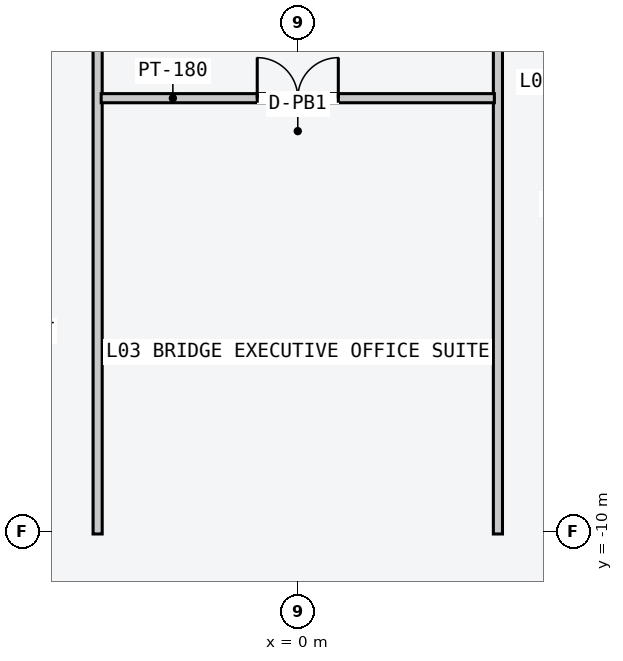
"""IFC4 building model, lengths in metres.
Left out: names, types, materials, properties, quantities, classifications, styles, units other than length and angle.
Written with IfcOpenShell. Run it as: python <this file> out.ifc"""

import sys

from ifc_helpers import new_model, si_unit, direction, frame, frame_2d, origin, place, context, subcontext, project, spatial, rectangle, extrude, element, fill, save


model = new_model("IFC4")
c1 = context("Model", 3, precision=1e-05, world=origin(), true_north=direction((0.0, 1.0)))
c2 = subcontext(c1, "Body", "Model", "MODEL_VIEW")
j1 = project(units=[si_unit("LENGTHUNIT", "METRE"), si_unit("PLANEANGLEUNIT", "RADIAN")], contexts=[c1])
p1 = place(None, origin())
s1 = spatial("IfcSite", under=j1, at=p1, CompositionType="ELEMENT")
p2 = place(p1, origin())
s2 = spatial("IfcBuilding", under=s1, at=p2, CompositionType="ELEMENT")
p3 = place(p2, frame((0.0, 0.0, 14.4)))
s3 = spatial("IfcBuildingStorey", under=s2, at=p3, CompositionType="ELEMENT", Elevation=14.4)
for number, where, z_axis, x_axis in (
    (1, (-3.95, -10.05, 0.0), (0.0, 0.0, 1.0), (0.0, 1.0, 0.0)),
    (2, (3.95, -10.05, 0.0), (0.0, 0.0, 1.0), (0.0, 1.0, 0.0)),
):
    element("IfcWall", number, at=place(p3, frame(where, z_axis=z_axis, x_axis=x_axis)), inside=s3, PredefinedType="PARTITIONING", context=c2, shape_type="SweptSolid", body=[
        extrude(rectangle(XDim=20.1, YDim=0.18, at=frame_2d((10.05, 0.0))), origin(), (0.0, 0.0, 1.0), 4.58),
    ])
p4 = place(p3, frame((-3.88, -1.45, 0.0), z_axis=(0.0, 0.0, 1.0), x_axis=(1.0, 0.0, 0.0)))
e3 = element("IfcWall", 3, at=p4, inside=s3, PredefinedType="PARTITIONING", context=c2, shape_type="SweptSolid", body=[
    extrude(rectangle(XDim=7.76, YDim=0.18, at=frame_2d((3.88, 0.0))), origin(), (0.0, 0.0, 1.0), 4.58),
])
p5 = place(p4, frame((3.08, 0.0, 0.0)))
e4 = element("IfcOpeningElement", 4, at=p5, cuts=e3, PredefinedType="OPENING", context=c2, shape_type="SweptSolid", body=[
    extrude(rectangle(XDim=1.6, YDim=2.3, at=frame_2d((0.8, 1.15))), frame((0.0, 0.1, 0.0), z_axis=(0.0, -1.0, 0.0), x_axis=(1.0, 0.0, 0.0)), (0.0, 0.0, 1.0), 0.2),
])
p6 = place(p5, origin())
e5 = element("IfcDoor", 5, at=p6, inside=s3, OperationType="DOUBLE_DOOR_SINGLE_SWING", PredefinedType="DOOR", context=c2, shape_type="SweptSolid", body=[
    extrude(rectangle(XDim=1.6, YDim=2.3, at=frame_2d((0.8, 1.15))), frame((0.0, 0.025, 0.0), z_axis=(0.0, -1.0, 0.0), x_axis=(1.0, 0.0, 0.0)), (0.0, 0.0, 1.0), 0.05),
])
fill(e4, e5)
save(model, sys.argv[1])
